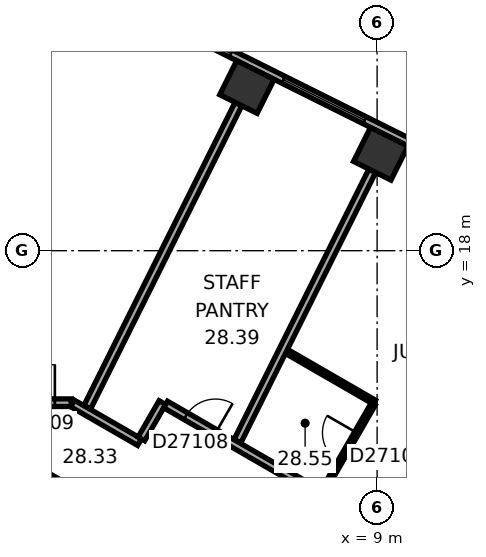
"""IFC4 building model, lengths in metres.
Left out: names, types, materials, properties, quantities, classifications, styles, units other than length and angle.
Written with IfcOpenShell. Run it as: python <this file> out.ifc"""

import sys

from ifc_helpers import new_model, si_unit, direction, frame, frame_2d, origin, origin_2d, place, context, subcontext, project, spatial, rectangle, extrude, element, fill, save


model = new_model("IFC4")
c1 = context("Model", 3, precision=1e-05, world=origin(), true_north=direction((0.0, 1.0)))
c2 = subcontext(c1, "Body", "Model", "MODEL_VIEW")
j1 = project(units=[si_unit("LENGTHUNIT", "METRE"), si_unit("PLANEANGLEUNIT", "RADIAN")], contexts=[c1])
p1 = place(None, origin())
s1 = spatial("IfcSite", under=j1, at=p1, CompositionType="ELEMENT")
p2 = place(p1, origin())
s2 = spatial("IfcBuilding", under=s1, at=p2, CompositionType="ELEMENT")
p3 = place(p2, frame((0.0, 0.0, 116.6)))
s3 = spatial("IfcBuildingStorey", under=s2, at=p3, CompositionType="ELEMENT", Elevation=116.6)
for number, where, z_axis, x_axis in (
    (1, (9.095, 20.551, 0.0), (0.0, 0.0, 1.0), (-0.895, 0.446, 0.0)),
    (2, (5.574, 22.306, 0.0), (0.0, 0.0, 1.0), (-0.895, 0.446, 0.0)),
):
    element("IfcColumn", number, at=place(p3, frame(where, z_axis=z_axis, x_axis=x_axis)), inside=s3, PredefinedType="COLUMN", context=c2, shape_type="SweptSolid", body=[
        extrude(rectangle(XDim=1.1, YDim=1.0, at=origin_2d()), origin(), (0.0, 0.0, 1.0), 3.3),
    ])
p4 = place(p3, frame((10.4, 5.658, 0.0), z_axis=(0.0, 0.0, 1.0), x_axis=(-0.866021384402, 0.500006961711, 0.0)))
e3 = element("IfcWall", 3, at=p4, inside=s3, PredefinedType="SHEAR", context=c2, shape_type="SweptSolid", body=[
    extrude(rectangle(XDim=12.355, YDim=1.2, at=frame_2d((6.178, 0.0))), origin(), (0.0, 0.0, 1.0), 3.3),
])
p5 = place(p4, frame((2.728, 0.0, 0.0)))
e4 = element("IfcOpeningElement", 4, at=p5, cuts=e3, PredefinedType="OPENING", context=c2, shape_type="SweptSolid", body=[
    extrude(rectangle(XDim=1.1, YDim=2.1, at=frame_2d((0.55, 1.05))), frame((0.0, 0.61, 0.0), z_axis=(0.0, -1.0, 0.0), x_axis=(1.0, 0.0, 0.0)), (0.0, 0.0, 1.0), 1.22),
])
p6 = place(p4, frame((5.328, 0.0, 0.0)))
e5 = element("IfcOpeningElement", 5, at=p6, cuts=e3, PredefinedType="OPENING", context=c2, shape_type="SweptSolid", body=[
    extrude(rectangle(XDim=1.1, YDim=2.1, at=frame_2d((0.55, 1.05))), frame((0.0, 0.61, 0.0), z_axis=(0.0, -1.0, 0.0), x_axis=(1.0, 0.0, 0.0)), (0.0, 0.0, 1.0), 1.22),
])
p7 = place(p4, frame((7.928, 0.0, 0.0)))
e6 = element("IfcOpeningElement", 6, at=p7, cuts=e3, PredefinedType="OPENING", context=c2, shape_type="SweptSolid", body=[
    extrude(rectangle(XDim=1.1, YDim=2.1, at=frame_2d((0.55, 1.05))), frame((0.0, 0.61, 0.0), z_axis=(0.0, -1.0, 0.0), x_axis=(1.0, 0.0, 0.0)), (0.0, 0.0, 1.0), 1.22),
])
p8 = place(p3, frame((0.3, 11.836, 0.0), z_axis=(0.0, 0.0, 1.0), x_axis=(-0.866021384402, -0.500006961711, 0.0)))
e7 = element("IfcWall", 7, at=p8, inside=s3, PredefinedType="SHEAR", context=c2, shape_type="SweptSolid", body=[
    extrude(rectangle(XDim=12.355, YDim=1.2, at=frame_2d((6.178, 0.0))), origin(), (0.0, 0.0, 1.0), 3.3),
])
p9 = place(p8, frame((6.378, 0.0, 0.0)))
e8 = element("IfcOpeningElement", 8, at=p9, cuts=e7, PredefinedType="OPENING", context=c2, shape_type="SweptSolid", body=[
    extrude(rectangle(XDim=1.5, YDim=2.1, at=frame_2d((0.75, 1.05))), frame((0.0, 0.61, 0.0), z_axis=(0.0, -1.0, 0.0), x_axis=(1.0, 0.0, 0.0)), (0.0, 0.0, 1.0), 1.22),
])
p10 = place(p8, frame((1.828, 0.0, 0.0)))
e9 = element("IfcOpeningElement", 9, at=p10, cuts=e7, PredefinedType="OPENING", context=c2, shape_type="SweptSolid", body=[
    extrude(rectangle(XDim=1.1, YDim=2.1, at=frame_2d((0.55, 1.05))), frame((0.0, 0.61, 0.0), z_axis=(0.0, -1.0, 0.0), x_axis=(1.0, 0.0, 0.0)), (0.0, 0.0, 1.0), 1.22),
])
p11 = place(p3, frame((20.63, 15.47, 0.0), z_axis=(0.0, 0.0, 1.0), x_axis=(-0.894934518609, 0.446197498203, 0.0)))
e10 = element("IfcWall", 10, at=p11, inside=s3, PredefinedType="STANDARD", context=c2, shape_type="SweptSolid", body=[
    extrude(rectangle(XDim=21.246, YDim=0.2, at=frame_2d((10.623, 0.0))), origin(), (0.0, 0.0, 1.0), 3.3),
])
p12 = place(p11, frame((1.553, 0.0, 0.8)))
e11 = element("IfcOpeningElement", 11, at=p12, cuts=e10, PredefinedType="OPENING", context=c2, shape_type="SweptSolid", body=[
    extrude(rectangle(XDim=2.4, YDim=1.7, at=frame_2d((1.2, 0.85))), frame((0.0, 0.11, 0.0), z_axis=(0.0, -1.0, 0.0), x_axis=(1.0, 0.0, 0.0)), (0.0, 0.0, 1.0), 0.22),
])
p13 = place(p11, frame((5.488, 0.0, 0.8)))
e12 = element("IfcOpeningElement", 12, at=p13, cuts=e10, PredefinedType="OPENING", context=c2, shape_type="SweptSolid", body=[
    extrude(rectangle(XDim=2.4, YDim=1.7, at=frame_2d((1.2, 0.85))), frame((0.0, 0.11, 0.0), z_axis=(0.0, -1.0, 0.0), x_axis=(1.0, 0.0, 0.0)), (0.0, 0.0, 1.0), 0.22),
])
p14 = place(p11, frame((9.422, 0.0, 0.8)))
e13 = element("IfcOpeningElement", 13, at=p14, cuts=e10, PredefinedType="OPENING", context=c2, shape_type="SweptSolid", body=[
    extrude(rectangle(XDim=2.4, YDim=1.7, at=frame_2d((1.2, 0.85))), frame((0.0, 0.11, 0.0), z_axis=(0.0, -1.0, 0.0), x_axis=(1.0, 0.0, 0.0)), (0.0, 0.0, 1.0), 0.22),
])
p15 = place(p11, frame((13.357, 0.0, 0.8)))
e14 = element("IfcOpeningElement", 14, at=p15, cuts=e10, PredefinedType="OPENING", context=c2, shape_type="SweptSolid", body=[
    extrude(rectangle(XDim=2.4, YDim=1.7, at=frame_2d((1.2, 0.85))), frame((0.0, 0.11, 0.0), z_axis=(0.0, -1.0, 0.0), x_axis=(1.0, 0.0, 0.0)), (0.0, 0.0, 1.0), 0.22),
])
p16 = place(p11, frame((17.292, 0.0, 0.8)))
e15 = element("IfcOpeningElement", 15, at=p16, cuts=e10, PredefinedType="OPENING", context=c2, shape_type="SweptSolid", body=[
    extrude(rectangle(XDim=2.4, YDim=1.7, at=frame_2d((1.2, 0.85))), frame((0.0, 0.11, 0.0), z_axis=(0.0, -1.0, 0.0), x_axis=(1.0, 0.0, 0.0)), (0.0, 0.0, 1.0), 0.22),
])
p17 = place(p3, frame((0.95, 14.001, 0.0), z_axis=(0.0, 0.0, 1.0), x_axis=(-1.0, 0.0, 0.0)))
e16 = element("IfcWall", 16, at=p17, inside=s3, PredefinedType="PARTITIONING", context=c2, shape_type="SweptSolid", body=[
    extrude(rectangle(XDim=1.86, YDim=0.2, at=frame_2d((0.93, 0.0))), origin(), (0.0, 0.0, 1.0), 2.95),
])
p18 = place(p17, frame((0.43, 0.0, 0.0)))
e17 = element("IfcOpeningElement", 17, at=p18, cuts=e16, PredefinedType="OPENING", context=c2, shape_type="SweptSolid", body=[
    extrude(rectangle(XDim=1.0, YDim=2.1, at=frame_2d((0.5, 1.05))), frame((0.0, 0.11, 0.0), z_axis=(0.0, -1.0, 0.0), x_axis=(1.0, 0.0, 0.0)), (0.0, 0.0, 1.0), 0.22),
])
p19 = place(p3, frame((2.748, 12.962, 0.0), z_axis=(0.0, 0.0, 1.0), x_axis=(-0.866013897511, 0.50001992892, 0.0)))
e18 = element("IfcWall", 18, at=p19, inside=s3, PredefinedType="PARTITIONING", context=c2, shape_type="SweptSolid", body=[
    extrude(rectangle(XDim=2.037, YDim=0.2, at=frame_2d((1.018, 0.0))), origin(), (0.0, 0.0, 1.0), 2.95),
])
p20 = place(p3, frame((3.349, 14.002, 0.0), z_axis=(0.0, 0.0, 1.0), x_axis=(-0.500074377092, -0.865982457891, 0.0)))
e19 = element("IfcWall", 19, at=p20, inside=s3, PredefinedType="PARTITIONING", context=c2, shape_type="SweptSolid", body=[
    extrude(rectangle(XDim=1.101, YDim=0.2, at=frame_2d((0.55, 0.0))), origin(), (0.0, 0.0, 1.0), 2.95),
])
p21 = place(p3, frame((5.351, 21.859, 0.0), z_axis=(0.0, 0.0, 1.0), x_axis=(-0.446205309328, -0.894930624086, 0.0)))
e20 = element("IfcWall", 20, at=p21, inside=s3, PredefinedType="PARTITIONING", context=c2, shape_type="SweptSolid", body=[
    extrude(rectangle(XDim=8.913, YDim=0.2, at=frame_2d((4.457, 0.0))), origin(), (0.0, 0.0, 1.0), 2.15),
])
p22 = place(p3, frame((6.614, 15.351, 0.0), z_axis=(0.0, 0.0, 1.0), x_axis=(0.866024262117, -0.500001977421, 0.0)))
e21 = element("IfcWall", 21, at=p22, inside=s3, PredefinedType="PARTITIONING", context=c2, shape_type="SweptSolid", body=[
    extrude(rectangle(XDim=2.671, YDim=0.12, at=frame_2d((1.336, 0.0))), origin(), (0.0, 0.0, 1.0), 2.95),
])
p23 = place(p3, frame((8.872, 20.104, 0.0), z_axis=(0.0, 0.0, 1.0), x_axis=(-0.446218378653, -0.894924107706, 0.0)))
e22 = element("IfcWall", 22, at=p23, inside=s3, PredefinedType="PARTITIONING", context=c2, shape_type="SweptSolid", body=[
    extrude(rectangle(XDim=7.95, YDim=0.2, at=frame_2d((3.975, 0.0))), origin(), (0.0, 0.0, 1.0), 2.95),
])
p24 = place(p3, frame((8.897, 13.963, 0.0), z_axis=(0.0, 0.0, 1.0), x_axis=(-0.500048002682, -0.865997687649, 0.0)))
e23 = element("IfcWall", 23, at=p24, inside=s3, PredefinedType="PARTITIONING", context=c2, shape_type="SweptSolid", body=[
    extrude(rectangle(XDim=2.64, YDim=0.12, at=frame_2d((1.32, 0.0))), origin(), (0.0, 0.0, 1.0), 2.15),
])
p25 = place(p24, frame((0.87, 0.0, 0.0)))
e24 = element("IfcOpeningElement", 24, at=p25, cuts=e23, PredefinedType="OPENING", context=c2, shape_type="SweptSolid", body=[
    extrude(rectangle(XDim=0.9, YDim=2.1, at=frame_2d((0.45, 1.05))), frame((0.0, 0.07, 0.0), z_axis=(0.0, -1.0, 0.0), x_axis=(1.0, 0.0, 0.0)), (0.0, 0.0, 1.0), 0.14),
])
p26 = place(p3, frame((10.885, 9.652, 0.0), z_axis=(0.0, 0.0, 1.0), x_axis=(-0.866033868542, 0.499985338323, 0.0)))
e25 = element("IfcWall", 25, at=p26, inside=s3, PredefinedType="PARTITIONING", context=c2, shape_type="SweptSolid", body=[
    extrude(rectangle(XDim=8.602, YDim=0.2, at=frame_2d((4.301, 0.0))), origin(), (0.0, 0.0, 1.0), 2.95),
])
p27 = place(p26, frame((1.464, 0.0, 0.0)))
e26 = element("IfcOpeningElement", 26, at=p27, cuts=e25, PredefinedType="OPENING", context=c2, shape_type="SweptSolid", body=[
    extrude(rectangle(XDim=0.9, YDim=2.1, at=frame_2d((0.45, 1.05))), frame((0.0, 0.11, 0.0), z_axis=(0.0, -1.0, 0.0), x_axis=(1.0, 0.0, 0.0)), (0.0, 0.0, 1.0), 0.22),
])
p28 = place(p26, frame((7.09, 0.0, 0.0)))
e27 = element("IfcOpeningElement", 27, at=p28, cuts=e25, PredefinedType="OPENING", context=c2, shape_type="SweptSolid", body=[
    extrude(rectangle(XDim=0.9, YDim=2.1, at=frame_2d((0.45, 1.05))), frame((0.0, 0.11, 0.0), z_axis=(0.0, -1.0, 0.0), x_axis=(1.0, 0.0, 0.0)), (0.0, 0.0, 1.0), 0.22),
])
p29 = place(p15, origin())
e28 = element("IfcWindow", 28, at=p29, inside=s3, PartitioningType="SINGLE_PANEL", PredefinedType="WINDOW", context=c2, shape_type="SweptSolid", body=[
    extrude(rectangle(XDim=2.4, YDim=1.7, at=frame_2d((1.2, 0.85))), frame((0.0, 0.03, 0.0), z_axis=(0.0, -1.0, 0.0), x_axis=(1.0, 0.0, 0.0)), (0.0, 0.0, 1.0), 0.06),
])
fill(e14, e28)
p30 = place(p16, origin())
e29 = element("IfcWindow", 29, at=p30, inside=s3, PartitioningType="SINGLE_PANEL", PredefinedType="WINDOW", context=c2, shape_type="SweptSolid", body=[
    extrude(rectangle(XDim=2.4, YDim=1.7, at=frame_2d((1.2, 0.85))), frame((0.0, 0.03, 0.0), z_axis=(0.0, -1.0, 0.0), x_axis=(1.0, 0.0, 0.0)), (0.0, 0.0, 1.0), 0.06),
])
fill(e15, e29)
p31 = place(p25, origin())
e30 = element("IfcDoor", 30, at=p31, inside=s3, OperationType="SINGLE_SWING_LEFT", PredefinedType="DOOR", context=c2, shape_type="SweptSolid", body=[
    extrude(rectangle(XDim=0.9, YDim=2.1, at=frame_2d((0.45, 1.05))), frame((0.0, 0.025, 0.0), z_axis=(0.0, -1.0, 0.0), x_axis=(1.0, 0.0, 0.0)), (0.0, 0.0, 1.0), 0.05),
])
fill(e24, e30)
p32 = place(p28, origin())
e31 = element("IfcDoor", 31, at=p32, inside=s3, OperationType="SINGLE_SWING_LEFT", PredefinedType="DOOR", context=c2, shape_type="SweptSolid", body=[
    extrude(rectangle(XDim=0.9, YDim=2.1, at=frame_2d((0.45, 1.05))), frame((0.0, 0.025, 0.0), z_axis=(0.0, -1.0, 0.0), x_axis=(1.0, 0.0, 0.0)), (0.0, 0.0, 1.0), 0.05),
])
fill(e27, e31)
p33 = place(p18, origin())
e32 = element("IfcDoor", 32, at=p33, inside=s3, OperationType="SINGLE_SWING_LEFT", PredefinedType="DOOR", context=c2, shape_type="SweptSolid", body=[
    extrude(rectangle(XDim=1.0, YDim=2.1, at=frame_2d((0.5, 1.05))), frame((0.0, 0.025, 0.0), z_axis=(0.0, -1.0, 0.0), x_axis=(1.0, 0.0, 0.0)), (0.0, 0.0, 1.0), 0.05),
])
fill(e17, e32)
save(model, sys.argv[1])
